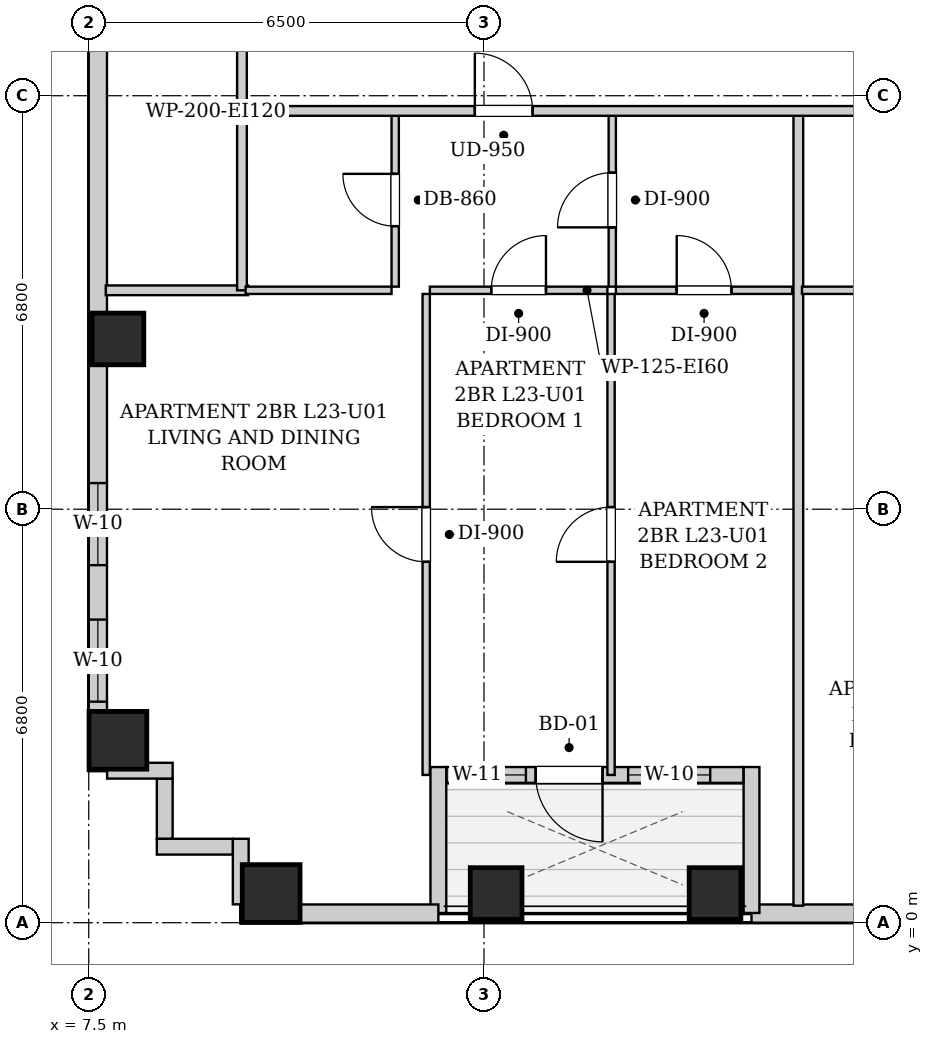
"""IFC4 building model, lengths in metres.
Left out: names, types, materials, properties, quantities, classifications, styles, units other than length and angle.
Written with IfcOpenShell. Run it as: python <this file> out.ifc"""

import sys

from ifc_helpers import new_model, si_unit, direction, frame, frame_2d, origin, origin_2d, place, context, subcontext, project, spatial, rectangle, extrude, element, fill, save


model = new_model("IFC4")
c1 = context("Model", 3, precision=1e-05, world=origin(), true_north=direction((0.0, 1.0)))
c2 = subcontext(c1, "Body", "Model", "MODEL_VIEW")
j1 = project(units=[si_unit("LENGTHUNIT", "METRE"), si_unit("PLANEANGLEUNIT", "RADIAN")], contexts=[c1])
p1 = place(None, origin())
s1 = spatial("IfcSite", under=j1, at=p1, CompositionType="ELEMENT")
p2 = place(p1, origin())
s2 = spatial("IfcBuilding", under=s1, at=p2, CompositionType="ELEMENT")
p3 = place(p2, frame((0.0, 0.0, 84.7)))
s3 = spatial("IfcBuildingStorey", under=s2, at=p3, CompositionType="ELEMENT", Elevation=84.7)
p4 = place(p3, frame((10.5, 0.48, 0.0), z_axis=(0.0, 0.0, 1.0), x_axis=(1.0, 0.0, 0.0)))
e1 = element("IfcColumn", 1, at=p4, inside=s3, PredefinedType="COLUMN", context=c2, shape_type="SweptSolid", body=[
    extrude(rectangle(XDim=0.95, YDim=0.95, at=origin_2d()), origin(), (0.0, 0.0, 1.0), 3.2),
])
for number, where, z_axis, x_axis in (
    (2, (14.2, 0.48, 0.0), (0.0, 0.0, 1.0), (1.0, 0.0, 0.0)),
    (3, (17.8, 0.48, 0.0), (0.0, 0.0, 1.0), (1.0, 0.0, 0.0)),
):
    element("IfcColumn", number, at=place(p3, frame(where, z_axis=z_axis, x_axis=x_axis)), inside=s3, PredefinedType="COLUMN", context=c2, shape_type="SweptSolid", body=[
        extrude(rectangle(XDim=0.85, YDim=0.85, at=origin_2d()), origin(), (0.0, 0.0, 1.0), 3.2),
    ])
p5 = place(p3, frame((7.98, 3.0, 0.0), z_axis=(0.0, 0.0, 1.0), x_axis=(1.0, 0.0, 0.0)))
e4 = element("IfcColumn", 4, at=p5, inside=s3, PredefinedType="COLUMN", context=c2, shape_type="SweptSolid", body=[
    extrude(rectangle(XDim=0.95, YDim=0.95, at=origin_2d()), origin(), (0.0, 0.0, 1.0), 3.2),
])
p6 = place(p3, frame((7.98, 9.6, 0.0), z_axis=(0.0, 0.0, 1.0), x_axis=(1.0, 0.0, 0.0)))
e5 = element("IfcColumn", 5, at=p6, inside=s3, PredefinedType="COLUMN", context=c2, shape_type="SweptSolid", body=[
    extrude(rectangle(XDim=0.85, YDim=0.85, at=origin_2d()), origin(), (0.0, 0.0, 1.0), 3.2),
])
p7 = place(p3, frame((40.9, 0.15, 0.0), z_axis=(0.0, 0.0, 1.0), x_axis=(-1.0, 0.0, 0.0)))
e6 = element("IfcWall", 6, at=p7, inside=s3, PredefinedType="SOLIDWALL", context=c2, shape_type="SweptSolid", body=[
    extrude(rectangle(XDim=22.5, YDim=0.3, at=frame_2d((11.25, 0.0))), origin(), (0.0, 0.0, 1.0), 2.94),
])
p8 = place(p7, frame((19.425, 0.0, 0.55)))
e7 = element("IfcOpeningElement", 7, at=p8, cuts=e6, PredefinedType="OPENING", context=c2, shape_type="SweptSolid", body=[
    extrude(rectangle(XDim=1.35, YDim=1.2, at=frame_2d((0.675, 0.6))), frame((0.0, 0.16, 0.0), z_axis=(0.0, -1.0, 0.0), x_axis=(1.0, 0.0, 0.0)), (0.0, 0.0, 1.0), 0.32),
])
p9 = place(p7, frame((12.55, 0.0, 0.55)))
e8 = element("IfcOpeningElement", 8, at=p9, cuts=e6, PredefinedType="OPENING", context=c2, shape_type="SweptSolid", body=[
    extrude(rectangle(XDim=0.85, YDim=1.2, at=frame_2d((0.425, 0.6))), frame((0.0, 0.16, 0.0), z_axis=(0.0, -1.0, 0.0), x_axis=(1.0, 0.0, 0.0)), (0.0, 0.0, 1.0), 0.32),
])
p10 = place(p7, frame((9.75, 0.0, 0.55)))
e9 = element("IfcOpeningElement", 9, at=p10, cuts=e6, PredefinedType="OPENING", context=c2, shape_type="SweptSolid", body=[
    extrude(rectangle(XDim=1.35, YDim=1.2, at=frame_2d((0.675, 0.6))), frame((0.0, 0.16, 0.0), z_axis=(0.0, -1.0, 0.0), x_axis=(1.0, 0.0, 0.0)), (0.0, 0.0, 1.0), 0.32),
])
p11 = place(p7, frame((6.265, 0.0, 0.55)))
e10 = element("IfcOpeningElement", 10, at=p11, cuts=e6, PredefinedType="OPENING", context=c2, shape_type="SweptSolid", body=[
    extrude(rectangle(XDim=0.85, YDim=1.2, at=frame_2d((0.425, 0.6))), frame((0.0, 0.16, 0.0), z_axis=(0.0, -1.0, 0.0), x_axis=(1.0, 0.0, 0.0)), (0.0, 0.0, 1.0), 0.32),
])
p12 = place(p7, frame((2.325, 0.0, 0.55)))
e11 = element("IfcOpeningElement", 11, at=p12, cuts=e6, PredefinedType="OPENING", context=c2, shape_type="SweptSolid", body=[
    extrude(rectangle(XDim=1.35, YDim=1.2, at=frame_2d((0.675, 0.6))), frame((0.0, 0.16, 0.0), z_axis=(0.0, -1.0, 0.0), x_axis=(1.0, 0.0, 0.0)), (0.0, 0.0, 1.0), 0.32),
])
p13 = place(p3, frame((18.4, 0.16, 0.0), z_axis=(0.0, 0.0, 1.0), x_axis=(0.0, 1.0, 0.0)))
e12 = element("IfcWall", 12, at=p13, inside=s3, PredefinedType="SOLIDWALL", context=c2, shape_type="SweptSolid", body=[
    extrude(rectangle(XDim=2.4, YDim=0.26, at=frame_2d((1.2, 0.0))), origin(), (0.0, 0.0, 1.0), 2.94),
])
p14 = place(p3, frame((18.266, 2.43, 0.0), z_axis=(0.0, 0.0, 1.0), x_axis=(-1.0, 0.0, 0.0)))
e13 = element("IfcWall", 13, at=p14, inside=s3, PredefinedType="SOLIDWALL", context=c2, shape_type="SweptSolid", body=[
    extrude(rectangle(XDim=4.882, YDim=0.26, at=frame_2d((2.441, 0.0))), origin(), (0.0, 0.0, 1.0), 2.94),
])
p15 = place(p14, frame((2.316, 0.0, 0.0)))
e14 = element("IfcOpeningElement", 14, at=p15, cuts=e13, PredefinedType="OPENING", context=c2, shape_type="SweptSolid", body=[
    extrude(rectangle(XDim=1.1, YDim=2.0, at=frame_2d((0.55, 1.0))), frame((0.0, 0.14, 0.0), z_axis=(0.0, -1.0, 0.0), x_axis=(1.0, 0.0, 0.0)), (0.0, 0.0, 1.0), 0.28),
])
p16 = place(p14, frame((3.576, 0.0, 0.55)))
e15 = element("IfcOpeningElement", 15, at=p16, cuts=e13, PredefinedType="OPENING", context=c2, shape_type="SweptSolid", body=[
    extrude(rectangle(XDim=0.85, YDim=1.2, at=frame_2d((0.425, 0.6))), frame((0.0, 0.14, 0.0), z_axis=(0.0, -1.0, 0.0), x_axis=(1.0, 0.0, 0.0)), (0.0, 0.0, 1.0), 0.28),
])
p17 = place(p14, frame((0.545, 0.0, 0.55)))
e16 = element("IfcOpeningElement", 16, at=p17, cuts=e13, PredefinedType="OPENING", context=c2, shape_type="SweptSolid", body=[
    extrude(rectangle(XDim=1.35, YDim=1.2, at=frame_2d((0.675, 0.6))), frame((0.0, 0.14, 0.0), z_axis=(0.0, -1.0, 0.0), x_axis=(1.0, 0.0, 0.0)), (0.0, 0.0, 1.0), 0.28),
])
p18 = place(p3, frame((13.25, 2.56, 0.0), z_axis=(0.0, 0.0, 1.0), x_axis=(0.0, -1.0, 0.0)))
e17 = element("IfcWall", 17, at=p18, inside=s3, PredefinedType="SOLIDWALL", context=c2, shape_type="SweptSolid", body=[
    extrude(rectangle(XDim=2.4, YDim=0.26, at=frame_2d((1.2, 0.0))), origin(), (0.0, 0.0, 1.0), 2.94),
])
p19 = place(p3, frame((13.25, 0.15, 0.0), z_axis=(0.0, 0.0, 1.0), x_axis=(-1.0, 0.0, 0.0)))
e18 = element("IfcWall", 18, at=p19, inside=s3, PredefinedType="SOLIDWALL", context=c2, shape_type="SweptSolid", body=[
    extrude(rectangle(XDim=3.25, YDim=0.3, at=frame_2d((1.625, 0.0))), origin(), (0.0, 0.0, 1.0), 2.94),
])
p20 = place(p3, frame((7.65, 2.5, 0.0), z_axis=(0.0, 0.0, 1.0), x_axis=(0.0, 1.0, 0.0)))
e19 = element("IfcWall", 19, at=p20, inside=s3, PredefinedType="SOLIDWALL", context=c2, shape_type="SweptSolid", body=[
    extrude(rectangle(XDim=38.3, YDim=0.3, at=frame_2d((19.15, 0.0))), origin(), (0.0, 0.0, 1.0), 2.94),
])
p21 = place(p20, frame((3.38, 0.0, 0.55)))
e20 = element("IfcOpeningElement", 20, at=p21, cuts=e19, PredefinedType="OPENING", context=c2, shape_type="SweptSolid", body=[
    extrude(rectangle(XDim=1.35, YDim=1.2, at=frame_2d((0.675, 0.6))), frame((0.0, 0.16, 0.0), z_axis=(0.0, -1.0, 0.0), x_axis=(1.0, 0.0, 0.0)), (0.0, 0.0, 1.0), 0.32),
])
p22 = place(p20, frame((1.135, 0.0, 0.55)))
e21 = element("IfcOpeningElement", 21, at=p22, cuts=e19, PredefinedType="OPENING", context=c2, shape_type="SweptSolid", body=[
    extrude(rectangle(XDim=1.35, YDim=1.2, at=frame_2d((0.675, 0.6))), frame((0.0, 0.16, 0.0), z_axis=(0.0, -1.0, 0.0), x_axis=(1.0, 0.0, 0.0)), (0.0, 0.0, 1.0), 0.32),
])
p23 = place(p20, frame((33.946, 0.0, 0.55)))
e22 = element("IfcOpeningElement", 22, at=p23, cuts=e19, PredefinedType="OPENING", context=c2, shape_type="SweptSolid", body=[
    extrude(rectangle(XDim=1.35, YDim=1.2, at=frame_2d((0.675, 0.6))), frame((0.0, 0.16, 0.0), z_axis=(0.0, -1.0, 0.0), x_axis=(1.0, 0.0, 0.0)), (0.0, 0.0, 1.0), 0.32),
])
p24 = place(p20, frame((32.085, 0.0, 0.55)))
e23 = element("IfcOpeningElement", 23, at=p24, cuts=e19, PredefinedType="OPENING", context=c2, shape_type="SweptSolid", body=[
    extrude(rectangle(XDim=1.35, YDim=1.2, at=frame_2d((0.675, 0.6))), frame((0.0, 0.16, 0.0), z_axis=(0.0, -1.0, 0.0), x_axis=(1.0, 0.0, 0.0)), (0.0, 0.0, 1.0), 0.32),
])
p25 = place(p20, frame((14.194, 0.0, 0.55)))
e24 = element("IfcOpeningElement", 24, at=p25, cuts=e19, PredefinedType="OPENING", context=c2, shape_type="SweptSolid", body=[
    extrude(rectangle(XDim=1.35, YDim=1.2, at=frame_2d((0.675, 0.6))), frame((0.0, 0.16, 0.0), z_axis=(0.0, -1.0, 0.0), x_axis=(1.0, 0.0, 0.0)), (0.0, 0.0, 1.0), 0.32),
])
p26 = place(p20, frame((23.582, 0.0, 0.55)))
e25 = element("IfcOpeningElement", 25, at=p26, cuts=e19, PredefinedType="OPENING", context=c2, shape_type="SweptSolid", body=[
    extrude(rectangle(XDim=1.35, YDim=1.2, at=frame_2d((0.675, 0.6))), frame((0.0, 0.16, 0.0), z_axis=(0.0, -1.0, 0.0), x_axis=(1.0, 0.0, 0.0)), (0.0, 0.0, 1.0), 0.32),
])
p27 = place(p3, frame((10.0, 0.302, 0.0), z_axis=(0.0, 0.0, 1.0), x_axis=(0.0, 1.0, 0.0)))
e26 = element("IfcWall", 26, at=p27, inside=s3, PredefinedType="SOLIDWALL", context=c2, shape_type="SweptSolid", body=[
    extrude(rectangle(XDim=1.078, YDim=0.26, at=frame_2d((0.539, 0.0))), origin(), (0.0, 0.0, 1.0), 2.94),
])
p28 = place(p3, frame((9.868, 1.25, 0.0), z_axis=(0.0, 0.0, 1.0), x_axis=(-1.0, 0.0, 0.0)))
e27 = element("IfcWall", 27, at=p28, inside=s3, PredefinedType="SOLIDWALL", context=c2, shape_type="SweptSolid", body=[
    extrude(rectangle(XDim=1.248, YDim=0.26, at=frame_2d((0.624, 0.0))), origin(), (0.0, 0.0, 1.0), 2.94),
])
p29 = place(p3, frame((8.75, 1.382, 0.0), z_axis=(0.0, 0.0, 1.0), x_axis=(0.0, 1.0, 0.0)))
e28 = element("IfcWall", 28, at=p29, inside=s3, PredefinedType="SOLIDWALL", context=c2, shape_type="SweptSolid", body=[
    extrude(rectangle(XDim=0.986, YDim=0.26, at=frame_2d((0.493, 0.0))), origin(), (0.0, 0.0, 1.0), 2.94),
])
p30 = place(p3, frame((8.88, 2.5, 0.0), z_axis=(0.0, 0.0, 1.0), x_axis=(-1.0, 0.0, 0.0)))
e29 = element("IfcWall", 29, at=p30, inside=s3, PredefinedType="SOLIDWALL", context=c2, shape_type="SweptSolid", body=[
    extrude(rectangle(XDim=1.078, YDim=0.26, at=frame_2d((0.539, 0.0))), origin(), (0.0, 0.0, 1.0), 2.94),
])
p31 = place(p3, frame((10.02, 13.35, 0.0), z_axis=(0.0, 0.0, 1.0), x_axis=(0.0, 1.0, 0.0)))
e30 = element("IfcWall", 30, at=p31, inside=s3, PredefinedType="PARTITIONING", context=c2, shape_type="SweptSolid", body=[
    extrude(rectangle(XDim=1.74, YDim=0.16, at=frame_2d((0.87, 0.0))), origin(), (0.0, 0.0, 1.0), 2.94),
])
p32 = place(p3, frame((7.78, 10.4, 0.0), z_axis=(0.0, 0.0, 1.0), x_axis=(1.0, 0.0, 0.0)))
e31 = element("IfcWall", 31, at=p32, inside=s3, PredefinedType="PARTITIONING", context=c2, shape_type="SweptSolid", body=[
    extrude(rectangle(XDim=2.34, YDim=0.16, at=frame_2d((1.17, 0.0))), origin(), (0.0, 0.0, 1.0), 2.94),
])
p33 = place(p3, frame((10.02, 10.4, 0.0), z_axis=(0.0, 0.0, 1.0), x_axis=(0.0, 1.0, 0.0)))
e32 = element("IfcWall", 32, at=p33, inside=s3, PredefinedType="PARTITIONING", context=c2, shape_type="SweptSolid", body=[
    extrude(rectangle(XDim=2.91, YDim=0.16, at=frame_2d((1.455, 0.0))), origin(), (0.0, 0.0, 1.0), 2.94),
])
p34 = place(p3, frame((12.54, 10.46, 0.0), z_axis=(0.0, 0.0, 1.0), x_axis=(0.0, 1.0, 0.0)))
e33 = element("IfcWall", 33, at=p34, inside=s3, PredefinedType="PARTITIONING", context=c2, shape_type="SweptSolid", body=[
    extrude(rectangle(XDim=2.85, YDim=0.12, at=frame_2d((1.425, 0.0))), origin(), (0.0, 0.0, 1.0), 2.94),
])
p35 = place(p34, frame((0.995, 0.0, 0.0)))
e34 = element("IfcOpeningElement", 34, at=p35, cuts=e33, PredefinedType="OPENING", context=c2, shape_type="SweptSolid", body=[
    extrude(rectangle(XDim=0.86, YDim=2.05, at=frame_2d((0.43, 1.025))), frame((0.0, 0.07, 0.0), z_axis=(0.0, -1.0, 0.0), x_axis=(1.0, 0.0, 0.0)), (0.0, 0.0, 1.0), 0.14),
])
p36 = place(p3, frame((10.08, 10.4, 0.0), z_axis=(0.0, 0.0, 1.0), x_axis=(1.0, 0.0, 0.0)))
e35 = element("IfcWall", 35, at=p36, inside=s3, PredefinedType="PARTITIONING", context=c2, shape_type="SweptSolid", body=[
    extrude(rectangle(XDim=2.4, YDim=0.12, at=frame_2d((1.2, 0.0))), origin(), (0.0, 0.0, 1.0), 2.94),
])
p37 = place(p3, frame((16.11, 10.46, 0.0), z_axis=(0.0, 0.0, 1.0), x_axis=(0.0, 1.0, 0.0)))
e36 = element("IfcWall", 36, at=p37, inside=s3, PredefinedType="PARTITIONING", context=c2, shape_type="SweptSolid", body=[
    extrude(rectangle(XDim=2.85, YDim=0.12, at=frame_2d((1.425, 0.0))), origin(), (0.0, 0.0, 1.0), 2.94),
])
p38 = place(p37, frame((0.975, 0.0, 0.0)))
e37 = element("IfcOpeningElement", 37, at=p38, cuts=e36, PredefinedType="OPENING", context=c2, shape_type="SweptSolid", body=[
    extrude(rectangle(XDim=0.9, YDim=2.05, at=frame_2d((0.45, 1.025))), frame((0.0, 0.07, 0.0), z_axis=(0.0, -1.0, 0.0), x_axis=(1.0, 0.0, 0.0)), (0.0, 0.0, 1.0), 0.14),
])
p39 = place(p3, frame((13.11, 10.4, 0.0), z_axis=(0.0, 0.0, 1.0), x_axis=(1.0, 0.0, 0.0)))
e38 = element("IfcWall", 38, at=p39, inside=s3, PredefinedType="PARTITIONING", context=c2, shape_type="SweptSolid", body=[
    extrude(rectangle(XDim=2.92, YDim=0.12, at=frame_2d((1.46, 0.0))), origin(), (0.0, 0.0, 1.0), 2.94),
])
p40 = place(p39, frame((1.01, 0.0, 0.0)))
e39 = element("IfcOpeningElement", 39, at=p40, cuts=e38, PredefinedType="OPENING", context=c2, shape_type="SweptSolid", body=[
    extrude(rectangle(XDim=0.9, YDim=2.05, at=frame_2d((0.45, 1.025))), frame((0.0, 0.07, 0.0), z_axis=(0.0, -1.0, 0.0), x_axis=(1.0, 0.0, 0.0)), (0.0, 0.0, 1.0), 0.14),
])
p41 = place(p3, frame((16.17, 10.4, 0.0), z_axis=(0.0, 0.0, 1.0), x_axis=(1.0, 0.0, 0.0)))
e40 = element("IfcWall", 40, at=p41, inside=s3, PredefinedType="PARTITIONING", context=c2, shape_type="SweptSolid", body=[
    extrude(rectangle(XDim=2.9, YDim=0.12, at=frame_2d((1.45, 0.0))), origin(), (0.0, 0.0, 1.0), 2.94),
])
p42 = place(p41, frame((1.0, 0.0, 0.0)))
e41 = element("IfcOpeningElement", 41, at=p42, cuts=e40, PredefinedType="OPENING", context=c2, shape_type="SweptSolid", body=[
    extrude(rectangle(XDim=0.9, YDim=2.05, at=frame_2d((0.45, 1.025))), frame((0.0, 0.07, 0.0), z_axis=(0.0, -1.0, 0.0), x_axis=(1.0, 0.0, 0.0)), (0.0, 0.0, 1.0), 0.14),
])
p43 = place(p3, frame((13.05, 2.43, 0.0), z_axis=(0.0, 0.0, 1.0), x_axis=(0.0, 1.0, 0.0)))
e42 = element("IfcWall", 42, at=p43, inside=s3, PredefinedType="PARTITIONING", context=c2, shape_type="SweptSolid", body=[
    extrude(rectangle(XDim=7.91, YDim=0.12, at=frame_2d((3.955, 0.0))), origin(), (0.0, 0.0, 1.0), 2.94),
])
p44 = place(p43, frame((3.505, 0.0, 0.0)))
e43 = element("IfcOpeningElement", 43, at=p44, cuts=e42, PredefinedType="OPENING", context=c2, shape_type="SweptSolid", body=[
    extrude(rectangle(XDim=0.9, YDim=2.05, at=frame_2d((0.45, 1.025))), frame((0.0, 0.07, 0.0), z_axis=(0.0, -1.0, 0.0), x_axis=(1.0, 0.0, 0.0)), (0.0, 0.0, 1.0), 0.14),
])
p45 = place(p3, frame((16.09, 2.43, 0.0), z_axis=(0.0, 0.0, 1.0), x_axis=(0.0, 1.0, 0.0)))
e44 = element("IfcWall", 44, at=p45, inside=s3, PredefinedType="PARTITIONING", context=c2, shape_type="SweptSolid", body=[
    extrude(rectangle(XDim=7.91, YDim=0.12, at=frame_2d((3.955, 0.0))), origin(), (0.0, 0.0, 1.0), 2.94),
])
p46 = place(p45, frame((3.505, 0.0, 0.0)))
e45 = element("IfcOpeningElement", 45, at=p46, cuts=e44, PredefinedType="OPENING", context=c2, shape_type="SweptSolid", body=[
    extrude(rectangle(XDim=0.9, YDim=2.05, at=frame_2d((0.45, 1.025))), frame((0.0, 0.07, 0.0), z_axis=(0.0, -1.0, 0.0), x_axis=(1.0, 0.0, 0.0)), (0.0, 0.0, 1.0), 0.14),
])
p47 = place(p3, frame((19.17, 0.28, 0.0), z_axis=(0.0, 0.0, 1.0), x_axis=(0.0, 1.0, 0.0)))
e46 = element("IfcWall", 46, at=p47, inside=s3, PredefinedType="PARTITIONING", context=c2, shape_type="SweptSolid", body=[
    extrude(rectangle(XDim=13.03, YDim=0.16, at=frame_2d((6.515, 0.0))), origin(), (0.0, 0.0, 1.0), 2.94),
])
p48 = place(p3, frame((19.23, 10.4, 0.0), z_axis=(0.0, 0.0, 1.0), x_axis=(1.0, 0.0, 0.0)))
e47 = element("IfcWall", 47, at=p48, inside=s3, PredefinedType="PARTITIONING", context=c2, shape_type="SweptSolid", body=[
    extrude(rectangle(XDim=2.4, YDim=0.12, at=frame_2d((1.2, 0.0))), origin(), (0.0, 0.0, 1.0), 2.94),
])
p49 = place(p3, frame((10.05, 13.35, 0.0), z_axis=(0.0, 0.0, 1.0), x_axis=(1.0, 0.0, 0.0)))
e48 = element("IfcWall", 48, at=p49, inside=s3, PredefinedType="PARTITIONING", context=c2, shape_type="SweptSolid", body=[
    extrude(rectangle(XDim=30.8, YDim=0.16, at=frame_2d((15.4, 0.0))), origin(), (0.0, 0.0, 1.0), 2.94),
])
p50 = place(p49, frame((3.8, 0.0, 0.0)))
e49 = element("IfcOpeningElement", 49, at=p50, cuts=e48, PredefinedType="OPENING", context=c2, shape_type="SweptSolid", body=[
    extrude(rectangle(XDim=0.95, YDim=2.1, at=frame_2d((0.475, 1.05))), frame((0.0, 0.09, 0.0), z_axis=(0.0, -1.0, 0.0), x_axis=(1.0, 0.0, 0.0)), (0.0, 0.0, 1.0), 0.18),
])
p51 = place(p49, frame((13.445, 0.0, 0.0)))
e50 = element("IfcOpeningElement", 50, at=p51, cuts=e48, PredefinedType="OPENING", context=c2, shape_type="SweptSolid", body=[
    extrude(rectangle(XDim=0.95, YDim=2.1, at=frame_2d((0.475, 1.05))), frame((0.0, 0.09, 0.0), z_axis=(0.0, -1.0, 0.0), x_axis=(1.0, 0.0, 0.0)), (0.0, 0.0, 1.0), 0.18),
])
p52 = place(p35, origin())
e51 = element("IfcDoor", 51, at=p52, inside=s3, OperationType="SINGLE_SWING_RIGHT", PredefinedType="DOOR", context=c2, shape_type="SweptSolid", body=[
    extrude(rectangle(XDim=0.86, YDim=2.05, at=frame_2d((0.43, 1.025))), frame((0.0, 0.025, 0.0), z_axis=(0.0, -1.0, 0.0), x_axis=(1.0, 0.0, 0.0)), (0.0, 0.0, 1.0), 0.05),
])
fill(e34, e51)
p53 = place(p38, origin())
e52 = element("IfcDoor", 52, at=p53, inside=s3, OperationType="SINGLE_SWING_LEFT", PredefinedType="DOOR", context=c2, shape_type="SweptSolid", body=[
    extrude(rectangle(XDim=0.9, YDim=2.05, at=frame_2d((0.45, 1.025))), frame((0.0, 0.025, 0.0), z_axis=(0.0, -1.0, 0.0), x_axis=(1.0, 0.0, 0.0)), (0.0, 0.0, 1.0), 0.05),
])
fill(e37, e52)
p54 = place(p40, origin())
e53 = element("IfcDoor", 53, at=p54, inside=s3, OperationType="SINGLE_SWING_RIGHT", PredefinedType="DOOR", context=c2, shape_type="SweptSolid", body=[
    extrude(rectangle(XDim=0.9, YDim=2.05, at=frame_2d((0.45, 1.025))), frame((0.0, 0.025, 0.0), z_axis=(0.0, -1.0, 0.0), x_axis=(1.0, 0.0, 0.0)), (0.0, 0.0, 1.0), 0.05),
])
fill(e39, e53)
p55 = place(p42, origin())
e54 = element("IfcDoor", 54, at=p55, inside=s3, OperationType="SINGLE_SWING_LEFT", PredefinedType="DOOR", context=c2, shape_type="SweptSolid", body=[
    extrude(rectangle(XDim=0.9, YDim=2.05, at=frame_2d((0.45, 1.025))), frame((0.0, 0.025, 0.0), z_axis=(0.0, -1.0, 0.0), x_axis=(1.0, 0.0, 0.0)), (0.0, 0.0, 1.0), 0.05),
])
fill(e41, e54)
p56 = place(p44, origin())
e55 = element("IfcDoor", 55, at=p56, inside=s3, OperationType="SINGLE_SWING_RIGHT", PredefinedType="DOOR", context=c2, shape_type="SweptSolid", body=[
    extrude(rectangle(XDim=0.9, YDim=2.05, at=frame_2d((0.45, 1.025))), frame((0.0, 0.025, 0.0), z_axis=(0.0, -1.0, 0.0), x_axis=(1.0, 0.0, 0.0)), (0.0, 0.0, 1.0), 0.05),
])
fill(e43, e55)
p57 = place(p46, origin())
e56 = element("IfcDoor", 56, at=p57, inside=s3, OperationType="SINGLE_SWING_LEFT", PredefinedType="DOOR", context=c2, shape_type="SweptSolid", body=[
    extrude(rectangle(XDim=0.9, YDim=2.05, at=frame_2d((0.45, 1.025))), frame((0.0, 0.025, 0.0), z_axis=(0.0, -1.0, 0.0), x_axis=(1.0, 0.0, 0.0)), (0.0, 0.0, 1.0), 0.05),
])
fill(e45, e56)
p58 = place(p50, origin())
e57 = element("IfcDoor", 57, at=p58, inside=s3, OperationType="SINGLE_SWING_LEFT", PredefinedType="DOOR", context=c2, shape_type="SweptSolid", body=[
    extrude(rectangle(XDim=0.95, YDim=2.1, at=frame_2d((0.475, 1.05))), frame((0.0, 0.025, 0.0), z_axis=(0.0, -1.0, 0.0), x_axis=(1.0, 0.0, 0.0)), (0.0, 0.0, 1.0), 0.05),
])
fill(e49, e57)
p59 = place(p15, origin())
e58 = element("IfcDoor", 58, at=p59, inside=s3, OperationType="SINGLE_SWING_LEFT", PredefinedType="DOOR", context=c2, shape_type="SweptSolid", body=[
    extrude(rectangle(XDim=1.1, YDim=2.0, at=frame_2d((0.55, 1.0))), frame((0.0, 0.025, 0.0), z_axis=(0.0, -1.0, 0.0), x_axis=(1.0, 0.0, 0.0)), (0.0, 0.0, 1.0), 0.05),
])
fill(e14, e58)
p60 = place(p21, origin())
e59 = element("IfcWindow", 59, at=p60, inside=s3, PartitioningType="SINGLE_PANEL", PredefinedType="WINDOW", context=c2, shape_type="SweptSolid", body=[
    extrude(rectangle(XDim=1.35, YDim=1.2, at=frame_2d((0.675, 0.6))), frame((0.0, 0.03, 0.0), z_axis=(0.0, -1.0, 0.0), x_axis=(1.0, 0.0, 0.0)), (0.0, 0.0, 1.0), 0.06),
])
fill(e20, e59)
p61 = place(p22, origin())
e60 = element("IfcWindow", 60, at=p61, inside=s3, PartitioningType="SINGLE_PANEL", PredefinedType="WINDOW", context=c2, shape_type="SweptSolid", body=[
    extrude(rectangle(XDim=1.35, YDim=1.2, at=frame_2d((0.675, 0.6))), frame((0.0, 0.03, 0.0), z_axis=(0.0, -1.0, 0.0), x_axis=(1.0, 0.0, 0.0)), (0.0, 0.0, 1.0), 0.06),
])
fill(e21, e60)
p62 = place(p16, origin())
e61 = element("IfcWindow", 61, at=p62, inside=s3, PartitioningType="SINGLE_PANEL", PredefinedType="WINDOW", context=c2, shape_type="SweptSolid", body=[
    extrude(rectangle(XDim=0.85, YDim=1.2, at=frame_2d((0.425, 0.6))), frame((0.0, 0.03, 0.0), z_axis=(0.0, -1.0, 0.0), x_axis=(1.0, 0.0, 0.0)), (0.0, 0.0, 1.0), 0.06),
])
fill(e15, e61)
p63 = place(p17, origin())
e62 = element("IfcWindow", 62, at=p63, inside=s3, PartitioningType="SINGLE_PANEL", PredefinedType="WINDOW", context=c2, shape_type="SweptSolid", body=[
    extrude(rectangle(XDim=1.35, YDim=1.2, at=frame_2d((0.675, 0.6))), frame((0.0, 0.03, 0.0), z_axis=(0.0, -1.0, 0.0), x_axis=(1.0, 0.0, 0.0)), (0.0, 0.0, 1.0), 0.06),
])
fill(e16, e62)
save(model, sys.argv[1])
